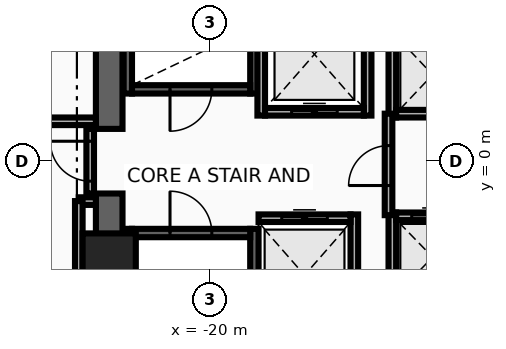
"""IFC4 building model, lengths in metres.
Left out: names, types, materials, properties, quantities, classifications, styles, units other than length and angle.
Written with IfcOpenShell. Run it as: python <this file> out.ifc"""

import sys

from ifc_helpers import new_model, si_unit, direction, frame, frame_2d, origin, origin_2d, place, context, subcontext, project, spatial, rectangle, extrude, source, transform, mapped, element, fill, save


model = new_model("IFC4")
c1 = context("Model", 3, precision=1e-05, world=origin(), true_north=direction((0.0, 1.0)))
c2 = subcontext(c1, "Body", "Model", "MODEL_VIEW")
j1 = project(units=[si_unit("LENGTHUNIT", "METRE"), si_unit("PLANEANGLEUNIT", "RADIAN")], contexts=[c1])
p1 = place(None, origin())
s1 = spatial("IfcSite", under=j1, at=p1, CompositionType="ELEMENT")
p2 = place(p1, origin())
s2 = spatial("IfcBuilding", under=s1, at=p2, CompositionType="ELEMENT")
p3 = place(p2, origin())
s3 = spatial("IfcBuildingStorey", under=s2, at=p3, CompositionType="ELEMENT", Elevation=0.0)
for number, where, z_axis, x_axis in (
    (1, (-22.16, 1.78, 0.0), (0.0, 0.0, 1.0), (0.0, 1.0, 0.0)),
    (2, (-18.83, 1.78, 0.0), (0.0, 0.0, 1.0), (0.0, 1.0, 0.0)),
):
    element("IfcWall", number, at=place(p3, frame(where, z_axis=z_axis, x_axis=x_axis)), inside=s3, PredefinedType="SHEAR", context=c2, shape_type="SweptSolid", body=[
        extrude(rectangle(XDim=8.67, YDim=0.22, at=frame_2d((4.335, 0.0))), origin(), (0.0, 0.0, 1.0), 4.92),
    ])
p4 = place(p3, frame((-22.05, 1.89, 0.0), z_axis=(0.0, 0.0, 1.0), x_axis=(1.0, 0.0, 0.0)))
e3 = element("IfcWall", 3, at=p4, inside=s3, PredefinedType="SHEAR", context=c2, shape_type="SweptSolid", body=[
    extrude(rectangle(XDim=3.11, YDim=0.22, at=frame_2d((1.555, 0.0))), origin(), (0.0, 0.0, 1.0), 4.92),
])
p5 = place(p4, frame((1.0, 0.0, 0.0)))
e4 = element("IfcOpeningElement", 4, at=p5, cuts=e3, PredefinedType="OPENING", context=c2, shape_type="SweptSolid", body=[
    extrude(rectangle(XDim=1.1, YDim=2.15, at=frame_2d((0.55, 1.075))), frame((0.0, 0.125, 0.0), z_axis=(0.0, -1.0, 0.0), x_axis=(1.0, 0.0, 0.0)), (0.0, 0.0, 1.0), 0.25),
])
for number, where, z_axis, x_axis in (
    (5, (-22.16, -10.45, 0.0), (0.0, 0.0, 1.0), (0.0, 1.0, 0.0)),
    (6, (-18.83, -10.45, 0.0), (0.0, 0.0, 1.0), (0.0, 1.0, 0.0)),
):
    element("IfcWall", number, at=place(p3, frame(where, z_axis=z_axis, x_axis=x_axis)), inside=s3, PredefinedType="SHEAR", context=c2, shape_type="SweptSolid", body=[
        extrude(rectangle(XDim=8.67, YDim=0.22, at=frame_2d((4.335, 0.0))), origin(), (0.0, 0.0, 1.0), 4.92),
    ])
p6 = place(p3, frame((-22.05, -1.89, 0.0), z_axis=(0.0, 0.0, 1.0), x_axis=(1.0, 0.0, 0.0)))
e7 = element("IfcWall", 7, at=p6, inside=s3, PredefinedType="SHEAR", context=c2, shape_type="SweptSolid", body=[
    extrude(rectangle(XDim=3.11, YDim=0.22, at=frame_2d((1.555, 0.0))), origin(), (0.0, 0.0, 1.0), 4.92),
])
p7 = place(p6, frame((1.0, 0.0, 0.0)))
e8 = element("IfcOpeningElement", 8, at=p7, cuts=e7, PredefinedType="OPENING", context=c2, shape_type="SweptSolid", body=[
    extrude(rectangle(XDim=1.1, YDim=2.15, at=frame_2d((0.55, 1.075))), frame((0.0, 0.125, 0.0), z_axis=(0.0, -1.0, 0.0), x_axis=(1.0, 0.0, 0.0)), (0.0, 0.0, 1.0), 0.25),
])
for number, where, z_axis, x_axis in (
    (9, (-22.65, -11.15, 0.0), (0.0, 0.0, 1.0), (0.0, 1.0, 0.0)),
    (10, (-22.65, 0.85, 0.0), (0.0, 0.0, 1.0), (0.0, 1.0, 0.0)),
):
    element("IfcWall", number, at=place(p3, frame(where, z_axis=z_axis, x_axis=x_axis)), inside=s3, PredefinedType="SHEAR", context=c2, shape_type="SweptSolid", body=[
        extrude(rectangle(XDim=10.3, YDim=0.7, at=frame_2d((5.15, 0.0))), origin(), (0.0, 0.0, 1.0), 4.92),
    ])
m1 = source(origin(), c2, "Body", "SweptSolid", [
    extrude(rectangle(XDim=1.4, YDim=1.4, at=origin_2d()), origin(), (0.0, 0.0, 1.0), 5.2),
])
p8 = place(p3, frame((-22.65, -2.6, 0.0), z_axis=(0.0, 0.0, 1.0), x_axis=(1.0, 0.0, 0.0)))
e11 = element("IfcColumn", 11, at=p8, inside=s3, PredefinedType="COLUMN", context=c2, shape_type="MappedRepresentation", body=[
    mapped(m1, transform((0.0, 0.0, 0.0), x_axis=(1.0, 0.0, 0.0), y_axis=(0.0, 1.0, 0.0), z_axis=(0.0, 0.0, 1.0), scale=1.0)),
])
for number, where, z_axis, x_axis in (
    (12, (-18.65, 1.2, 0.0), (0.0, 0.0, 1.0), (0.0, 1.0, 0.0)),
    (13, (-15.85, 1.2, 0.0), (0.0, 0.0, 1.0), (0.0, 1.0, 0.0)),
):
    element("IfcWall", number, at=place(p3, frame(where, z_axis=z_axis, x_axis=x_axis)), inside=s3, PredefinedType="MOVABLE", context=c2, shape_type="SweptSolid", body=[
        extrude(rectangle(XDim=3.225, YDim=0.2, at=frame_2d((1.613, 0.0))), origin(), (0.0, 0.0, 1.0), 4.92),
    ])
p9 = place(p3, frame((-18.55, 1.3, 0.0), z_axis=(0.0, 0.0, 1.0), x_axis=(1.0, 0.0, 0.0)))
e14 = element("IfcWall", 14, at=p9, inside=s3, PredefinedType="MOVABLE", context=c2, shape_type="SweptSolid", body=[
    extrude(rectangle(XDim=2.6, YDim=0.2, at=frame_2d((1.3, 0.0))), origin(), (0.0, 0.0, 1.0), 4.92),
])
p10 = place(p9, frame((0.7, 0.0, 0.0)))
e15 = element("IfcOpeningElement", 15, at=p10, cuts=e14, PredefinedType="OPENING", context=c2, shape_type="SweptSolid", body=[
    extrude(rectangle(XDim=1.2, YDim=2.1, at=frame_2d((0.6, 1.05))), frame((0.0, 0.115, 0.0), z_axis=(0.0, -1.0, 0.0), x_axis=(1.0, 0.0, 0.0)), (0.0, 0.0, 1.0), 0.23),
])
p11 = place(p3, frame((-16.2, -4.6, 0.0), z_axis=(0.0, 0.0, 1.0), x_axis=(0.0, 1.0, 0.0)))
e16 = element("IfcWall", 16, at=p11, inside=s3, PredefinedType="MOVABLE", context=c2, shape_type="SweptSolid", body=[
    extrude(rectangle(XDim=3.2, YDim=0.2, at=frame_2d((1.6, 0.0))), origin(), (0.0, 0.0, 1.0), 4.92),
])
p12 = place(p3, frame((-18.72, -1.5, 0.0), z_axis=(0.0, 0.0, 1.0), x_axis=(1.0, 0.0, 0.0)))
e17 = element("IfcWall", 17, at=p12, inside=s3, PredefinedType="MOVABLE", context=c2, shape_type="SweptSolid", body=[
    extrude(rectangle(XDim=2.42, YDim=0.2, at=frame_2d((1.21, 0.0))), origin(), (0.0, 0.0, 1.0), 4.92),
])
p13 = place(p12, frame((0.61, 0.0, 0.0)))
e18 = element("IfcOpeningElement", 18, at=p13, cuts=e17, PredefinedType="OPENING", context=c2, shape_type="SweptSolid", body=[
    extrude(rectangle(XDim=1.2, YDim=2.1, at=frame_2d((0.6, 1.05))), frame((0.0, 0.115, 0.0), z_axis=(0.0, -1.0, 0.0), x_axis=(1.0, 0.0, 0.0)), (0.0, 0.0, 1.0), 0.23),
])
p14 = place(p3, frame((-15.2, 1.15, 0.0), z_axis=(0.0, 0.0, 1.0), x_axis=(0.0, 1.0, 0.0)))
e19 = element("IfcWall", 19, at=p14, inside=s3, PredefinedType="MOVABLE", context=c2, shape_type="SweptSolid", body=[
    extrude(rectangle(XDim=2.25, YDim=0.2, at=frame_2d((1.125, 0.0))), origin(), (0.0, 0.0, 1.0), 4.92),
])
p15 = place(p3, frame((-15.1, 1.25, 0.0), z_axis=(0.0, 0.0, 1.0), x_axis=(1.0, 0.0, 0.0)))
e20 = element("IfcWall", 20, at=p15, inside=s3, PredefinedType="MOVABLE", context=c2, shape_type="SweptSolid", body=[
    extrude(rectangle(XDim=1.92, YDim=0.2, at=frame_2d((0.96, 0.0))), origin(), (0.0, 0.0, 1.0), 4.92),
])
p16 = place(p3, frame((-15.2, -3.7, 0.0), z_axis=(0.0, 0.0, 1.0), x_axis=(0.0, 1.0, 0.0)))
e21 = element("IfcWall", 21, at=p16, inside=s3, PredefinedType="MOVABLE", context=c2, shape_type="SweptSolid", body=[
    extrude(rectangle(XDim=2.35, YDim=0.2, at=frame_2d((1.175, 0.0))), origin(), (0.0, 0.0, 1.0), 4.92),
])
p17 = place(p3, frame((-15.1, -1.45, 0.0), z_axis=(0.0, 0.0, 1.0), x_axis=(1.0, 0.0, 0.0)))
e22 = element("IfcWall", 22, at=p17, inside=s3, PredefinedType="MOVABLE", context=c2, shape_type="SweptSolid", body=[
    extrude(rectangle(XDim=1.92, YDim=0.2, at=frame_2d((0.96, 0.0))), origin(), (0.0, 0.0, 1.0), 4.92),
])
p18 = place(p17, frame((0.41, 0.0, 0.0)))
e23 = element("IfcOpeningElement", 23, at=p18, cuts=e22, PredefinedType="OPENING", context=c2, shape_type="SweptSolid", body=[
    extrude(rectangle(XDim=1.1, YDim=2.1, at=frame_2d((0.55, 1.05))), frame((0.0, 0.115, 0.0), z_axis=(0.0, -1.0, 0.0), x_axis=(1.0, 0.0, 0.0)), (0.0, 0.0, 1.0), 0.23),
])
p19 = place(p3, frame((-15.3, -1.42, 0.0), z_axis=(0.0, 0.0, 1.0), x_axis=(0.0, 1.0, 0.0)))
e24 = element("IfcWall", 24, at=p19, inside=s3, PredefinedType="PARTITIONING", context=c2, shape_type="SweptSolid", body=[
    extrude(rectangle(XDim=2.67, YDim=0.2, at=frame_2d((1.335, 0.0))), origin(), (0.0, 0.0, 1.0), 4.92),
])
p20 = place(p19, frame((0.78, 0.0, 0.0)))
e25 = element("IfcOpeningElement", 25, at=p20, cuts=e24, PredefinedType="OPENING", context=c2, shape_type="SweptSolid", body=[
    extrude(rectangle(XDim=1.05, YDim=2.15, at=frame_2d((0.525, 1.075))), frame((0.0, 0.115, 0.0), z_axis=(0.0, -1.0, 0.0), x_axis=(1.0, 0.0, 0.0)), (0.0, 0.0, 1.0), 0.23),
])
p21 = place(p3, frame((-23.15, -0.85, 0.0), z_axis=(0.0, 0.0, 1.0), x_axis=(0.0, 1.0, 0.0)))
e26 = element("IfcWall", 26, at=p21, inside=s3, PredefinedType="PARTITIONING", context=c2, shape_type="SweptSolid", body=[
    extrude(rectangle(XDim=1.7, YDim=0.2, at=frame_2d((0.85, 0.0))), origin(), (0.0, 0.0, 1.0), 4.439),
])
p22 = place(p21, frame((0.325, 0.0, 0.0)))
e27 = element("IfcOpeningElement", 27, at=p22, cuts=e26, PredefinedType="OPENING", context=c2, shape_type="SweptSolid", body=[
    extrude(rectangle(XDim=1.05, YDim=2.15, at=frame_2d((0.525, 1.075))), frame((0.0, 0.115, 0.0), z_axis=(0.0, -1.0, 0.0), x_axis=(1.0, 0.0, 0.0)), (0.0, 0.0, 1.0), 0.23),
])
p23 = place(p3, frame((-26.0, 1.05, 0.0), z_axis=(0.0, 0.0, 1.0), x_axis=(1.0, 0.0, 0.0)))
e28 = element("IfcWall", 28, at=p23, inside=s3, PredefinedType="PARTITIONING", context=c2, shape_type="SweptSolid", body=[
    extrude(rectangle(XDim=3.0, YDim=0.2, at=frame_2d((1.5, 0.0))), origin(), (0.0, 0.0, 1.0), 4.92),
])
p24 = place(p3, frame((-23.45, -1.05, 0.0), z_axis=(0.0, 0.0, 1.0), x_axis=(1.0, 0.0, 0.0)))
e29 = element("IfcWall", 29, at=p24, inside=s3, PredefinedType="PARTITIONING", context=c2, shape_type="SweptSolid", body=[
    extrude(rectangle(XDim=0.45, YDim=0.2, at=frame_2d((0.225, 0.0))), origin(), (0.0, 0.0, 1.0), 4.92),
])
p25 = place(p3, frame((-23.45, -22.74, 0.0), z_axis=(0.0, 0.0, 1.0), x_axis=(0.0, 1.0, 0.0)))
e30 = element("IfcWall", 30, at=p25, inside=s3, PredefinedType="PARTITIONING", context=c2, shape_type="SweptSolid", body=[
    extrude(rectangle(XDim=21.69, YDim=0.2, at=frame_2d((10.845, 0.0))), origin(), (0.0, 0.0, 1.0), 3.957),
])
p26 = place(p10, origin())
e31 = element("IfcDoor", 31, at=p26, inside=s3, OperationType="DOUBLE_DOOR_SLIDING", PredefinedType="DOOR", context=c2, shape_type="SweptSolid", body=[
    extrude(rectangle(XDim=1.2, YDim=2.1, at=frame_2d((0.6, 1.05))), frame((0.0, 0.025, 0.0), z_axis=(0.0, -1.0, 0.0), x_axis=(1.0, 0.0, 0.0)), (0.0, 0.0, 1.0), 0.05),
])
fill(e15, e31)
p27 = place(p13, origin())
e32 = element("IfcDoor", 32, at=p27, inside=s3, OperationType="DOUBLE_DOOR_SLIDING", PredefinedType="DOOR", context=c2, shape_type="SweptSolid", body=[
    extrude(rectangle(XDim=1.2, YDim=2.1, at=frame_2d((0.6, 1.05))), frame((0.0, 0.025, 0.0), z_axis=(0.0, -1.0, 0.0), x_axis=(1.0, 0.0, 0.0)), (0.0, 0.0, 1.0), 0.05),
])
fill(e18, e32)
p28 = place(p18, origin())
e33 = element("IfcDoor", 33, at=p28, inside=s3, OperationType="DOUBLE_DOOR_SLIDING", PredefinedType="DOOR", context=c2, shape_type="SweptSolid", body=[
    extrude(rectangle(XDim=1.1, YDim=2.1, at=frame_2d((0.55, 1.05))), frame((0.0, 0.025, 0.0), z_axis=(0.0, -1.0, 0.0), x_axis=(1.0, 0.0, 0.0)), (0.0, 0.0, 1.0), 0.05),
])
fill(e23, e33)
p29 = place(p20, origin())
e34 = element("IfcDoor", 34, at=p29, inside=s3, OperationType="SINGLE_SWING_RIGHT", PredefinedType="DOOR", context=c2, shape_type="SweptSolid", body=[
    extrude(rectangle(XDim=1.05, YDim=2.15, at=frame_2d((0.525, 1.075))), frame((0.0, 0.025, 0.0), z_axis=(0.0, -1.0, 0.0), x_axis=(1.0, 0.0, 0.0)), (0.0, 0.0, 1.0), 0.05),
])
fill(e25, e34)
p30 = place(p5, frame((1.1, 0.0, 0.0), z_axis=(0.0, 0.0, 1.0), x_axis=(-1.0, 0.0, 0.0)))
e35 = element("IfcDoor", 35, at=p30, inside=s3, OperationType="SINGLE_SWING_LEFT", PredefinedType="DOOR", context=c2, shape_type="SweptSolid", body=[
    extrude(rectangle(XDim=1.1, YDim=2.15, at=frame_2d((0.55, 1.075))), frame((0.0, 0.025, 0.0), z_axis=(0.0, -1.0, 0.0), x_axis=(1.0, 0.0, 0.0)), (0.0, 0.0, 1.0), 0.05),
])
fill(e4, e35)
p31 = place(p7, origin())
e36 = element("IfcDoor", 36, at=p31, inside=s3, OperationType="SINGLE_SWING_RIGHT", PredefinedType="DOOR", context=c2, shape_type="SweptSolid", body=[
    extrude(rectangle(XDim=1.1, YDim=2.15, at=frame_2d((0.55, 1.075))), frame((0.0, 0.025, 0.0), z_axis=(0.0, -1.0, 0.0), x_axis=(1.0, 0.0, 0.0)), (0.0, 0.0, 1.0), 0.05),
])
fill(e8, e36)
p32 = place(p22, origin())
e37 = element("IfcDoor", 37, at=p32, inside=s3, OperationType="SINGLE_SWING_LEFT", PredefinedType="DOOR", context=c2, shape_type="SweptSolid", body=[
    extrude(rectangle(XDim=1.05, YDim=2.15, at=frame_2d((0.525, 1.075))), frame((0.0, 0.025, 0.0), z_axis=(0.0, -1.0, 0.0), x_axis=(1.0, 0.0, 0.0)), (0.0, 0.0, 1.0), 0.05),
])
fill(e27, e37)
save(model, sys.argv[1])
